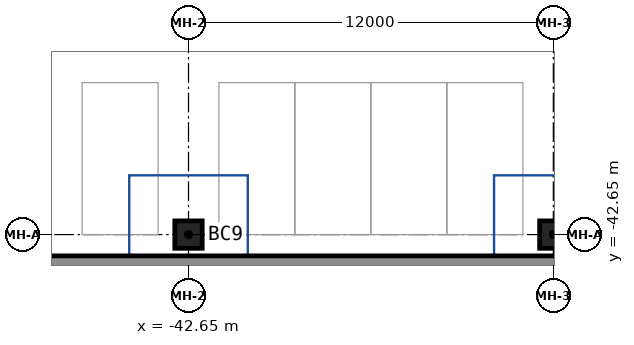
"""IFC4 building model, lengths in metres.
Left out: names, types, materials, properties, quantities, classifications, styles, units other than length and angle.
Written with IfcOpenShell. Run it as: python <this file> out.ifc"""

import sys

from ifc_helpers import new_model, si_unit, direction, frame, frame_2d, origin, origin_2d, place, context, subcontext, project, spatial, rectangle, extrude, source, transform, mapped, element, save


model = new_model("IFC4")
c1 = context("Model", 3, precision=1e-05, world=origin(), true_north=direction((0.0, 1.0)))
c2 = subcontext(c1, "Body", "Model", "MODEL_VIEW")
j1 = project(units=[si_unit("LENGTHUNIT", "METRE"), si_unit("PLANEANGLEUNIT", "RADIAN")], contexts=[c1])
p1 = place(None, origin())
s1 = spatial("IfcSite", under=j1, at=p1, CompositionType="ELEMENT")
p2 = place(p1, origin())
s2 = spatial("IfcBuilding", under=s1, at=p2, CompositionType="ELEMENT")
p3 = place(p2, frame((0.0, 0.0, -9.0)))
s3 = spatial("IfcBuildingStorey", under=s2, at=p3, CompositionType="ELEMENT", Elevation=-9.0)
m1 = source(origin(), c2, "Body", "SweptSolid", [
    extrude(rectangle(XDim=0.9, YDim=0.9, at=origin_2d()), origin(), (0.0, 0.0, 1.0), 4.5),
])
for number, where, z_axis, x_axis in (
    (1, (-42.65, -42.65, 0.0), (0.0, 0.0, 1.0), (1.0, 0.0, 0.0)),
    (2, (-30.65, -42.65, 0.0), (0.0, 0.0, 1.0), (1.0, 0.0, 0.0)),
):
    element("IfcColumn", number, at=place(p3, frame(where, z_axis=z_axis, x_axis=x_axis)), inside=s3, PredefinedType="COLUMN", context=c2, shape_type="MappedRepresentation", body=[
        mapped(m1, transform((0.0, 0.0, 0.0))),
    ])
m2 = source(origin(), c2, "Body", "SweptSolid", [
    extrude(rectangle(XDim=113.0, YDim=0.5, at=frame_2d((56.5, 0.0))), origin(), (0.0, 0.0, 1.0), 4.9),
])
p4 = place(p3, frame((-57.15, -43.6, -0.4), z_axis=(0.0, 0.0, 1.0), x_axis=(1.0, 0.0, 0.0)))
e3 = element("IfcWall", 3, at=p4, inside=s3, PredefinedType="SOLIDWALL", context=c2, shape_type="MappedRepresentation", body=[
    mapped(m2, transform((0.0, 0.0, 0.0))),
])
save(model, sys.argv[1])
